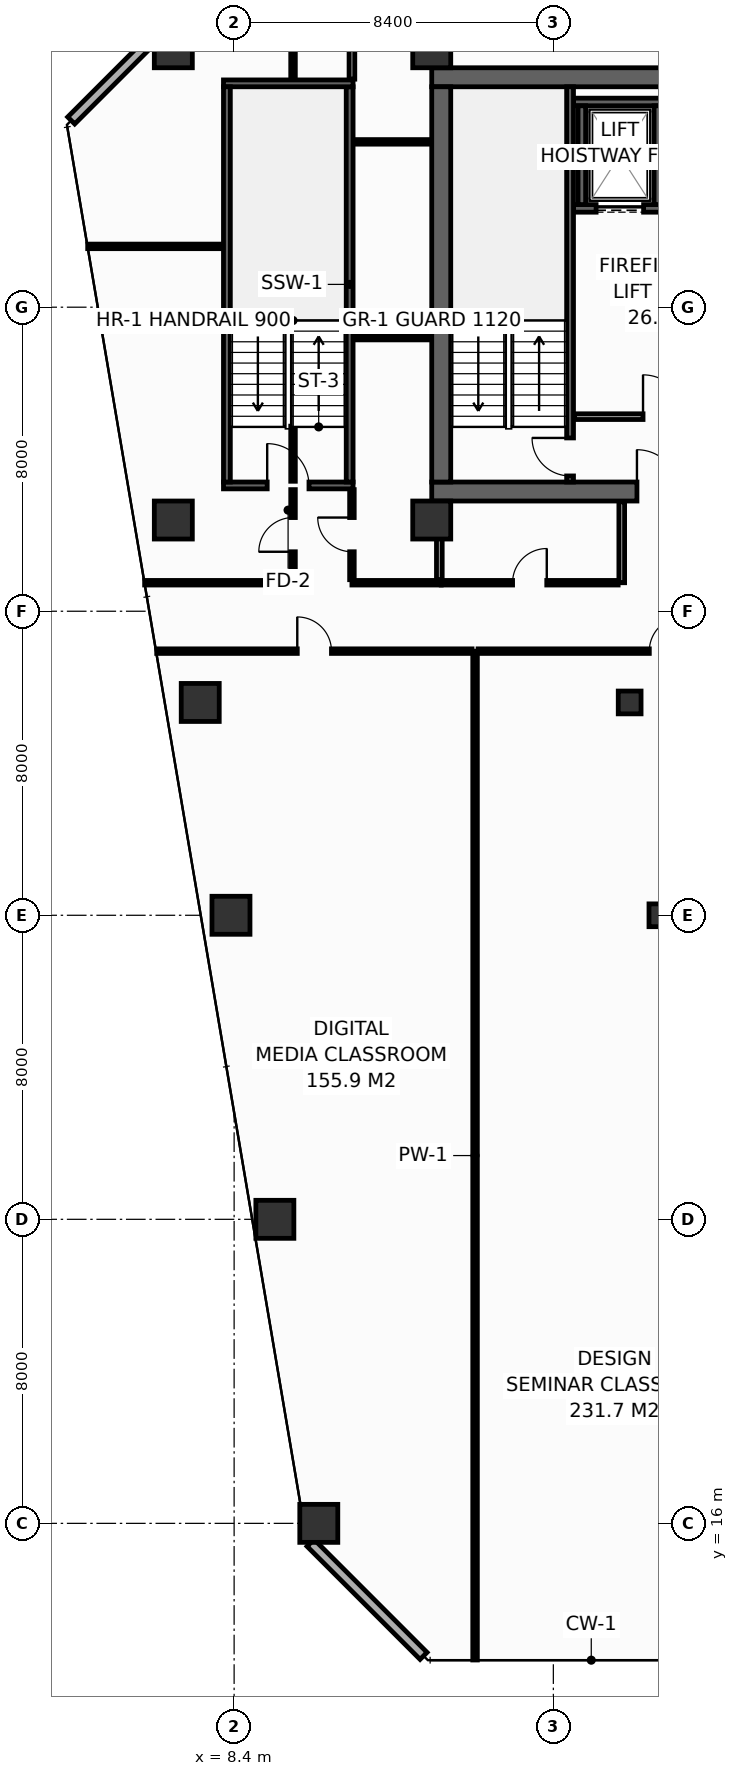
"""IFC4 building model, lengths in metres.
Left out: names, types, materials, properties, quantities, classifications, styles, units other than length and angle.
Written with IfcOpenShell. Run it as: python <this file> out.ifc"""

import sys

from ifc_helpers import new_model, si_unit, direction, frame, frame_2d, origin, origin_2d, place, context, subcontext, project, spatial, rectangle, hollow_rectangle, extrude, element, fill, save


model = new_model("IFC4")
c1 = context("Model", 3, precision=1e-05, world=origin(), true_north=direction((0.0, 1.0)))
c2 = subcontext(c1, "Body", "Model", "MODEL_VIEW")
j1 = project(units=[si_unit("LENGTHUNIT", "METRE"), si_unit("PLANEANGLEUNIT", "RADIAN")], contexts=[c1])
p1 = place(None, origin())
s1 = spatial("IfcSite", under=j1, at=p1, CompositionType="ELEMENT")
p2 = place(p1, origin())
s2 = spatial("IfcBuilding", under=s1, at=p2, CompositionType="ELEMENT")
p3 = place(p2, frame((0.0, 0.0, 171.4)))
s3 = spatial("IfcBuildingStorey", under=s2, at=p3, CompositionType="ELEMENT", Elevation=171.4)
p4 = place(p3, frame((13.6, 43.15, 0.0), z_axis=(0.0, 0.0, 1.0), x_axis=(1.0, 0.0, 0.0)))
e1 = element("IfcWall", 1, at=p4, inside=s3, PredefinedType="SHEAR", context=c2, shape_type="SweptSolid", body=[
    extrude(rectangle(XDim=32.7, YDim=0.5, at=frame_2d((16.35, 0.0))), origin(), (0.0, 0.0, 1.0), 3.55),
])
p5 = place(p4, frame((5.4, 0.0, 0.0)))
e2 = element("IfcOpeningElement", 2, at=p5, cuts=e1, PredefinedType="OPENING", context=c2, shape_type="SweptSolid", body=[
    extrude(rectangle(XDim=1.1, YDim=2.15, at=frame_2d((0.55, 1.075))), frame((0.0, 0.26, 0.0), z_axis=(0.0, -1.0, 0.0), x_axis=(1.0, 0.0, 0.0)), (0.0, 0.0, 1.0), 0.52),
])
p6 = place(p4, frame((25.6, 0.0, 0.0)))
e3 = element("IfcOpeningElement", 3, at=p6, cuts=e1, PredefinedType="OPENING", context=c2, shape_type="SweptSolid", body=[
    extrude(rectangle(XDim=1.1, YDim=2.15, at=frame_2d((0.55, 1.075))), frame((0.0, 0.26, 0.0), z_axis=(0.0, -1.0, 0.0), x_axis=(1.0, 0.0, 0.0)), (0.0, 0.0, 1.0), 0.52),
])
p7 = place(p3, frame((13.6, 54.05, 0.0), z_axis=(0.0, 0.0, 1.0), x_axis=(1.0, 0.0, 0.0)))
e4 = element("IfcWall", 4, at=p7, inside=s3, PredefinedType="SHEAR", context=c2, shape_type="SweptSolid", body=[
    extrude(rectangle(XDim=32.7, YDim=0.5, at=frame_2d((16.35, 0.0))), origin(), (0.0, 0.0, 1.0), 3.55),
])
p8 = place(p3, frame((13.85, 43.4, 0.0), z_axis=(0.0, 0.0, 1.0), x_axis=(0.0, 1.0, 0.0)))
e5 = element("IfcWall", 5, at=p8, inside=s3, PredefinedType="SHEAR", context=c2, shape_type="SweptSolid", body=[
    extrude(rectangle(XDim=10.4, YDim=0.5, at=frame_2d((5.2, 0.0))), origin(), (0.0, 0.0, 1.0), 3.55),
])
for number, where, z_axis, x_axis in (
    (6, (6.8, 54.8, 0.0), (0.0, 0.0, 1.0), (1.0, 0.0, 0.0)),
    (7, (13.6, 54.8, 0.0), (0.0, 0.0, 1.0), (1.0, 0.0, 0.0)),
    (8, (6.8, 42.4, 0.0), (0.0, 0.0, 1.0), (1.0, 0.0, 0.0)),
    (9, (13.6, 42.4, 0.0), (0.0, 0.0, 1.0), (1.0, 0.0, 0.0)),
    (10, (10.628, 16.0, 0.0), (0.0, 0.0, 1.0), (1.0, 0.0, 0.0)),
    (11, (9.472, 24.0, 0.0), (0.0, 0.0, 1.0), (1.0, 0.0, 0.0)),
    (12, (8.317, 32.0, 0.0), (0.0, 0.0, 1.0), (1.0, 0.0, 0.0)),
):
    element("IfcColumn", number, at=place(p3, frame(where, z_axis=z_axis, x_axis=x_axis)), inside=s3, PredefinedType="COLUMN", context=c2, shape_type="SweptSolid", body=[
        extrude(hollow_rectangle(XDim=1.0, YDim=1.0, WallThickness=0.045, at=origin_2d()), origin(), (0.0, 0.0, 1.0), 3.8),
    ])
p9 = place(p3, frame((19.617, 32.0, 0.0), z_axis=(0.0, 0.0, 1.0), x_axis=(1.0, 0.0, 0.0)))
e13 = element("IfcColumn", 13, at=p9, inside=s3, PredefinedType="COLUMN", context=c2, shape_type="SweptSolid", body=[
    extrude(hollow_rectangle(XDim=0.6, YDim=0.6, WallThickness=0.028, at=origin_2d()), origin(), (0.0, 0.0, 1.0), 3.8),
])
p10 = place(p3, frame((7.508, 37.6, 0.0), z_axis=(0.0, 0.0, 1.0), x_axis=(1.0, 0.0, 0.0)))
e14 = element("IfcColumn", 14, at=p10, inside=s3, PredefinedType="COLUMN", context=c2, shape_type="SweptSolid", body=[
    extrude(hollow_rectangle(XDim=1.0, YDim=1.0, WallThickness=0.045, at=origin_2d()), origin(), (0.0, 0.0, 1.0), 3.8),
])
p11 = place(p3, frame((18.808, 37.6, 0.0), z_axis=(0.0, 0.0, 1.0), x_axis=(1.0, 0.0, 0.0)))
e15 = element("IfcColumn", 15, at=p11, inside=s3, PredefinedType="COLUMN", context=c2, shape_type="SweptSolid", body=[
    extrude(hollow_rectangle(XDim=0.6, YDim=0.6, WallThickness=0.028, at=origin_2d()), origin(), (0.0, 0.0, 1.0), 3.8),
])
p12 = place(p3, frame((17.33, 50.6, 0.0), z_axis=(0.0, 0.0, 1.0), x_axis=(1.0, 0.0, 0.0)))
e16 = element("IfcWall", 16, at=p12, inside=s3, PredefinedType="SHEAR", context=c2, shape_type="SweptSolid", body=[
    extrude(rectangle(XDim=2.52, YDim=0.2, at=frame_2d((1.26, 0.0))), origin(), (0.0, 0.0, 1.0), 3.55),
])
p13 = place(p12, frame((0.595, 0.0, 0.0)))
e17 = element("IfcOpeningElement", 17, at=p13, cuts=e16, PredefinedType="OPENING", context=c2, shape_type="SweptSolid", body=[
    extrude(rectangle(XDim=1.25, YDim=2.3, at=frame_2d((0.625, 1.15))), frame((0.0, 0.11, 0.0), z_axis=(0.0, -1.0, 0.0), x_axis=(1.0, 0.0, 0.0)), (0.0, 0.0, 1.0), 0.22),
])
p14 = place(p3, frame((17.33, 53.4, 0.0), z_axis=(0.0, 0.0, 1.0), x_axis=(1.0, 0.0, 0.0)))
e18 = element("IfcWall", 18, at=p14, inside=s3, PredefinedType="SHEAR", context=c2, shape_type="SweptSolid", body=[
    extrude(rectangle(XDim=2.52, YDim=0.2, at=frame_2d((1.26, 0.0))), origin(), (0.0, 0.0, 1.0), 3.55),
])
for number, where, z_axis, x_axis in (
    (19, (17.55, 50.7, 0.0), (0.0, 0.0, 1.0), (0.0, 1.0, 0.0)),
    (20, (19.55, 50.7, 0.0), (0.0, 0.0, 1.0), (0.0, 1.0, 0.0)),
):
    element("IfcWall", number, at=place(p3, frame(where, z_axis=z_axis, x_axis=x_axis)), inside=s3, PredefinedType="SHEAR", context=c2, shape_type="SweptSolid", body=[
        extrude(rectangle(XDim=2.6, YDim=0.2, at=frame_2d((1.3, 0.0))), origin(), (0.0, 0.0, 1.0), 3.55),
    ])
p15 = place(p3, frame((17.24, 43.4, 0.0), z_axis=(0.0, 0.0, 1.0), x_axis=(0.0, 1.0, 0.0)))
e21 = element("IfcWall", 21, at=p15, inside=s3, PredefinedType="SHEAR", context=c2, shape_type="SweptSolid", body=[
    extrude(rectangle(XDim=10.4, YDim=0.18, at=frame_2d((5.2, 0.0))), origin(), (0.0, 0.0, 1.0), 3.55),
])
p16 = place(p15, frame((0.16, 0.0, 0.0)))
e22 = element("IfcOpeningElement", 22, at=p16, cuts=e21, PredefinedType="OPENING", context=c2, shape_type="SweptSolid", body=[
    extrude(rectangle(XDim=1.0, YDim=2.15, at=frame_2d((0.5, 1.075))), frame((0.0, 0.1, 0.0), z_axis=(0.0, -1.0, 0.0), x_axis=(1.0, 0.0, 0.0)), (0.0, 0.0, 1.0), 0.2),
])
p17 = place(p3, frame((8.12, 43.31, 0.0), z_axis=(0.0, 0.0, 1.0), x_axis=(1.0, 0.0, 0.0)))
e23 = element("IfcWall", 23, at=p17, inside=s3, PredefinedType="SHEAR", context=c2, shape_type="SweptSolid", body=[
    extrude(rectangle(XDim=3.41, YDim=0.18, at=frame_2d((1.705, 0.0))), origin(), (0.0, 0.0, 1.0), 3.55),
])
p18 = place(p17, frame((1.15, 0.0, 0.0)))
e24 = element("IfcOpeningElement", 24, at=p18, cuts=e23, PredefinedType="OPENING", context=c2, shape_type="SweptSolid", body=[
    extrude(rectangle(XDim=1.1, YDim=2.15, at=frame_2d((0.55, 1.075))), frame((0.0, 0.1, 0.0), z_axis=(0.0, -1.0, 0.0), x_axis=(1.0, 0.0, 0.0)), (0.0, 0.0, 1.0), 0.2),
])
p19 = place(p3, frame((11.44, 43.4, 0.0), z_axis=(0.0, 0.0, 1.0), x_axis=(0.0, 1.0, 0.0)))
e25 = element("IfcWall", 25, at=p19, inside=s3, PredefinedType="SHEAR", context=c2, shape_type="SweptSolid", body=[
    extrude(rectangle(XDim=10.4, YDim=0.18, at=frame_2d((5.2, 0.0))), origin(), (0.0, 0.0, 1.0), 3.55),
])
p20 = place(p3, frame((11.53, 53.89, 0.0), z_axis=(0.0, 0.0, 1.0), x_axis=(-1.0, 0.0, 0.0)))
e26 = element("IfcWall", 26, at=p20, inside=s3, PredefinedType="SHEAR", context=c2, shape_type="SweptSolid", body=[
    extrude(rectangle(XDim=3.41, YDim=0.18, at=frame_2d((1.705, 0.0))), origin(), (0.0, 0.0, 1.0), 3.55),
])
p21 = place(p3, frame((8.21, 53.8, 0.0), z_axis=(0.0, 0.0, 1.0), x_axis=(0.0, -1.0, 0.0)))
e27 = element("IfcWall", 27, at=p21, inside=s3, PredefinedType="SHEAR", context=c2, shape_type="SweptSolid", body=[
    extrude(rectangle(XDim=10.4, YDim=0.18, at=frame_2d((5.2, 0.0))), origin(), (0.0, 0.0, 1.0), 3.55),
])
p22 = place(p3, frame((17.36, 45.12, 0.0), z_axis=(0.0, 0.0, 1.0), x_axis=(1.0, 0.0, 0.0)))
e28 = element("IfcWall", 28, at=p22, inside=s3, PredefinedType="PARTITIONING", context=c2, shape_type="SweptSolid", body=[
    extrude(rectangle(XDim=5.14, YDim=0.15, at=frame_2d((2.57, 0.0))), origin(), (0.0, 0.0, 1.0), 3.55),
])
p23 = place(p22, frame((1.8, 0.0, 0.0)))
e29 = element("IfcOpeningElement", 29, at=p23, cuts=e28, PredefinedType="OPENING", context=c2, shape_type="SweptSolid", body=[
    extrude(rectangle(XDim=1.1, YDim=2.15, at=frame_2d((0.55, 1.075))), frame((0.0, 0.085, 0.0), z_axis=(0.0, -1.0, 0.0), x_axis=(1.0, 0.0, 0.0)), (0.0, 0.0, 1.0), 0.17),
])
p24 = place(p3, frame((10.411, 15.487, 0.0), z_axis=(0.0, 0.0, 1.0), x_axis=(0.707135806771, -0.70707775441, 0.0)))
e30 = element("IfcWall", 30, at=p24, inside=s3, PredefinedType="STANDARD", context=c2, shape_type="SweptSolid", body=[
    extrude(rectangle(XDim=4.206, YDim=0.26, at=frame_2d((2.103, 0.0))), origin(), (0.0, 0.0, 1.0), 3.55),
])
p25 = place(p3, frame((7.087, 55.887, 0.0), z_axis=(0.0, 0.0, 1.0), x_axis=(-0.707106781187, -0.707106781187, 0.0)))
e31 = element("IfcWall", 31, at=p25, inside=s3, PredefinedType="STANDARD", context=c2, shape_type="SweptSolid", body=[
    extrude(rectangle(XDim=4.206, YDim=0.26, at=frame_2d((2.103, 0.0))), origin(), (0.0, 0.0, 1.0), 3.55),
])
p26 = place(p3, frame((6.045, 40.75, 0.0), z_axis=(0.0, 0.0, 1.0), x_axis=(1.0, 0.0, 0.0)))
e32 = element("IfcWall", 32, at=p26, inside=s3, PredefinedType="PARTITIONING", context=c2, shape_type="SweptSolid", body=[
    extrude(rectangle(XDim=3.905, YDim=0.12, at=frame_2d((1.952, 0.0))), origin(), (0.0, 0.0, 1.0), 3.035),
])
p27 = place(p3, frame((11.5, 40.75, 0.0), z_axis=(0.0, 0.0, 1.0), x_axis=(1.0, 0.0, 0.0)))
e33 = element("IfcWall", 33, at=p27, inside=s3, PredefinedType="PARTITIONING", context=c2, shape_type="SweptSolid", body=[
    extrude(rectangle(XDim=2.35, YDim=0.12, at=frame_2d((1.175, 0.0))), origin(), (0.0, 0.0, 1.0), 3.55),
])
p28 = place(p3, frame((11.55, 52.35, 0.0), z_axis=(0.0, 0.0, 1.0), x_axis=(1.0, 0.0, 0.0)))
e34 = element("IfcWall", 34, at=p28, inside=s3, PredefinedType="PARTITIONING", context=c2, shape_type="SweptSolid", body=[
    extrude(rectangle(XDim=2.03, YDim=0.12, at=frame_2d((1.015, 0.0))), origin(), (0.0, 0.0, 1.0), 3.55),
])
p29 = place(p3, frame((11.5, 54.0, 0.0), z_axis=(0.0, 0.0, 1.0), x_axis=(0.0, 1.0, 0.0)))
e35 = element("IfcWall", 35, at=p29, inside=s3, PredefinedType="PARTITIONING", context=c2, shape_type="SweptSolid", body=[
    extrude(rectangle(XDim=1.995, YDim=0.15, at=frame_2d((0.998, 0.0))), origin(), (0.0, 0.0, 1.0), 2.935),
])
p30 = place(p3, frame((4.547, 49.6, 0.0), z_axis=(0.0, 0.0, 1.0), x_axis=(1.0, 0.0, 0.0)))
e36 = element("IfcWall", 36, at=p30, inside=s3, PredefinedType="PARTITIONING", context=c2, shape_type="SweptSolid", body=[
    extrude(rectangle(XDim=3.553, YDim=0.12, at=frame_2d((1.777, 0.0))), origin(), (0.0, 0.0, 1.0), 2.835),
])
p31 = place(p3, frame((9.95, 40.83, 0.0), z_axis=(0.0, 0.0, 1.0), x_axis=(0.0, 1.0, 0.0)))
e37 = element("IfcWall", 37, at=p31, inside=s3, PredefinedType="PARTITIONING", context=c2, shape_type="SweptSolid", body=[
    extrude(rectangle(XDim=2.37, YDim=0.12, at=frame_2d((1.185, 0.0))), origin(), (0.0, 0.0, 1.0), 2.835),
])
p32 = place(p31, frame((0.735, 0.0, 0.0)))
e38 = element("IfcOpeningElement", 38, at=p32, cuts=e37, PredefinedType="OPENING", context=c2, shape_type="SweptSolid", body=[
    extrude(rectangle(XDim=0.9, YDim=2.1, at=frame_2d((0.45, 1.05))), frame((0.0, 0.07, 0.0), z_axis=(0.0, -1.0, 0.0), x_axis=(1.0, 0.0, 0.0)), (0.0, 0.0, 1.0), 0.14),
])
p33 = place(p3, frame((9.95, 43.42, 0.0), z_axis=(0.0, 0.0, 1.0), x_axis=(0.0, 1.0, 0.0)))
e39 = element("IfcWall", 39, at=p33, inside=s3, PredefinedType="PARTITIONING", context=c2, shape_type="SweptSolid", body=[
    extrude(rectangle(XDim=1.45, YDim=0.12, at=frame_2d((0.725, 0.0))), origin(), (0.0, 0.0, 1.0), 3.55),
])
p34 = place(p3, frame((9.95, 54.0, 0.0), z_axis=(0.0, 0.0, 1.0), x_axis=(0.0, 1.0, 0.0)))
e40 = element("IfcWall", 40, at=p34, inside=s3, PredefinedType="PARTITIONING", context=c2, shape_type="SweptSolid", body=[
    extrude(rectangle(XDim=1.995, YDim=0.12, at=frame_2d((0.998, 0.0))), origin(), (0.0, 0.0, 1.0), 2.935),
])
p35 = place(p3, frame((11.55, 47.2, 0.0), z_axis=(0.0, 0.0, 1.0), x_axis=(1.0, 0.0, 0.0)))
e41 = element("IfcWall", 41, at=p35, inside=s3, PredefinedType="PARTITIONING", context=c2, shape_type="SweptSolid", body=[
    extrude(rectangle(XDim=2.03, YDim=0.12, at=frame_2d((1.015, 0.0))), origin(), (0.0, 0.0, 1.0), 3.55),
])
p36 = place(p3, frame((11.5, 40.83, 0.0), z_axis=(0.0, 0.0, 1.0), x_axis=(0.0, 1.0, 0.0)))
e42 = element("IfcWall", 42, at=p36, inside=s3, PredefinedType="PARTITIONING", context=c2, shape_type="SweptSolid", body=[
    extrude(rectangle(XDim=2.37, YDim=0.12, at=frame_2d((1.185, 0.0))), origin(), (0.0, 0.0, 1.0), 2.835),
])
p37 = place(p36, frame((0.735, 0.0, 0.0)))
e43 = element("IfcOpeningElement", 43, at=p37, cuts=e42, PredefinedType="OPENING", context=c2, shape_type="SweptSolid", body=[
    extrude(rectangle(XDim=0.9, YDim=2.1, at=frame_2d((0.45, 1.05))), frame((0.0, 0.07, 0.0), z_axis=(0.0, -1.0, 0.0), x_axis=(1.0, 0.0, 0.0)), (0.0, 0.0, 1.0), 0.14),
])
p38 = place(p3, frame((13.8, 40.83, 0.0), z_axis=(0.0, 0.0, 1.0), x_axis=(0.0, 1.0, 0.0)))
e44 = element("IfcWall", 44, at=p38, inside=s3, PredefinedType="PARTITIONING", context=c2, shape_type="SweptSolid", body=[
    extrude(rectangle(XDim=2.05, YDim=0.15, at=frame_2d((1.025, 0.0))), origin(), (0.0, 0.0, 1.0), 3.55),
])
p39 = place(p3, frame((18.6, 40.75, 0.0), z_axis=(0.0, 0.0, 1.0), x_axis=(0.0, 1.0, 0.0)))
e45 = element("IfcWall", 45, at=p39, inside=s3, PredefinedType="PARTITIONING", context=c2, shape_type="SweptSolid", body=[
    extrude(rectangle(XDim=2.13, YDim=0.15, at=frame_2d((1.065, 0.0))), origin(), (0.0, 0.0, 1.0), 3.55),
])
p40 = place(p3, frame((13.85, 40.75, 0.0), z_axis=(0.0, 0.0, 1.0), x_axis=(1.0, 0.0, 0.0)))
e46 = element("IfcWall", 46, at=p40, inside=s3, PredefinedType="PARTITIONING", context=c2, shape_type="SweptSolid", body=[
    extrude(rectangle(XDim=4.655, YDim=0.12, at=frame_2d((2.327, 0.0))), origin(), (0.0, 0.0, 1.0), 3.55),
])
p41 = place(p40, frame((1.877, 0.0, 0.0)))
e47 = element("IfcOpeningElement", 47, at=p41, cuts=e46, PredefinedType="OPENING", context=c2, shape_type="SweptSolid", body=[
    extrude(rectangle(XDim=0.9, YDim=2.1, at=frame_2d((0.45, 1.05))), frame((0.0, 0.07, 0.0), z_axis=(0.0, -1.0, 0.0), x_axis=(1.0, 0.0, 0.0)), (0.0, 0.0, 1.0), 0.14),
])
p42 = place(p3, frame((14.74, 12.405, 0.0), z_axis=(0.0, 0.0, 1.0), x_axis=(0.0, 1.0, 0.0)))
e48 = element("IfcWall", 48, at=p42, inside=s3, PredefinedType="PARTITIONING", context=c2, shape_type="SweptSolid", body=[
    extrude(rectangle(XDim=26.545, YDim=0.12, at=frame_2d((13.272, 0.0))), origin(), (0.0, 0.0, 1.0), 2.835),
])
p43 = place(p3, frame((6.363, 38.95, 0.0), z_axis=(0.0, 0.0, 1.0), x_axis=(1.0, 0.0, 0.0)))
e49 = element("IfcWall", 49, at=p43, inside=s3, PredefinedType="PARTITIONING", context=c2, shape_type="SweptSolid", body=[
    extrude(rectangle(XDim=8.297, YDim=0.12, at=frame_2d((4.148, 0.0))), origin(), (0.0, 0.0, 1.0), 3.035),
])
p44 = place(p43, frame((3.699, 0.0, 0.0)))
e50 = element("IfcOpeningElement", 50, at=p44, cuts=e49, PredefinedType="OPENING", context=c2, shape_type="SweptSolid", body=[
    extrude(rectangle(XDim=0.9, YDim=2.1, at=frame_2d((0.45, 1.05))), frame((0.0, 0.07, 0.0), z_axis=(0.0, -1.0, 0.0), x_axis=(1.0, 0.0, 0.0)), (0.0, 0.0, 1.0), 0.14),
])
p45 = place(p3, frame((14.82, 38.95, 0.0), z_axis=(0.0, 0.0, 1.0), x_axis=(1.0, 0.0, 0.0)))
e51 = element("IfcWall", 51, at=p45, inside=s3, PredefinedType="PARTITIONING", context=c2, shape_type="SweptSolid", body=[
    extrude(rectangle(XDim=9.03, YDim=0.12, at=frame_2d((4.515, 0.0))), origin(), (0.0, 0.0, 1.0), 2.835),
])
p46 = place(p45, frame((4.505, 0.0, 0.0)))
e52 = element("IfcOpeningElement", 52, at=p46, cuts=e51, PredefinedType="OPENING", context=c2, shape_type="SweptSolid", body=[
    extrude(rectangle(XDim=0.9, YDim=2.1, at=frame_2d((0.45, 1.05))), frame((0.0, 0.07, 0.0), z_axis=(0.0, -1.0, 0.0), x_axis=(1.0, 0.0, 0.0)), (0.0, 0.0, 1.0), 0.14),
])
p47 = place(p13, origin())
e53 = element("IfcDoor", 53, at=p47, inside=s3, OperationType="SLIDING_TO_LEFT", PredefinedType="DOOR", context=c2, shape_type="SweptSolid", body=[
    extrude(rectangle(XDim=1.25, YDim=2.3, at=frame_2d((0.625, 1.15))), frame((0.0, 0.025, 0.0), z_axis=(0.0, -1.0, 0.0), x_axis=(1.0, 0.0, 0.0)), (0.0, 0.0, 1.0), 0.05),
])
fill(e17, e53)
p48 = place(p16, origin())
e54 = element("IfcDoor", 54, at=p48, inside=s3, OperationType="SINGLE_SWING_RIGHT", PredefinedType="DOOR", context=c2, shape_type="SweptSolid", body=[
    extrude(rectangle(XDim=1.0, YDim=2.15, at=frame_2d((0.5, 1.075))), frame((0.0, 0.025, 0.0), z_axis=(0.0, -1.0, 0.0), x_axis=(1.0, 0.0, 0.0)), (0.0, 0.0, 1.0), 0.05),
])
fill(e22, e54)
p49 = place(p18, origin())
e55 = element("IfcDoor", 55, at=p49, inside=s3, OperationType="SINGLE_SWING_LEFT", PredefinedType="DOOR", context=c2, shape_type="SweptSolid", body=[
    extrude(rectangle(XDim=1.1, YDim=2.15, at=frame_2d((0.55, 1.075))), frame((0.0, 0.025, 0.0), z_axis=(0.0, -1.0, 0.0), x_axis=(1.0, 0.0, 0.0)), (0.0, 0.0, 1.0), 0.05),
])
fill(e24, e55)
p50 = place(p23, origin())
e56 = element("IfcDoor", 56, at=p50, inside=s3, OperationType="SINGLE_SWING_LEFT", PredefinedType="DOOR", context=c2, shape_type="SweptSolid", body=[
    extrude(rectangle(XDim=1.1, YDim=2.15, at=frame_2d((0.55, 1.075))), frame((0.0, 0.025, 0.0), z_axis=(0.0, -1.0, 0.0), x_axis=(1.0, 0.0, 0.0)), (0.0, 0.0, 1.0), 0.05),
])
fill(e29, e56)
p51 = place(p5, origin())
e57 = element("IfcDoor", 57, at=p51, inside=s3, OperationType="SINGLE_SWING_LEFT", PredefinedType="DOOR", context=c2, shape_type="SweptSolid", body=[
    extrude(rectangle(XDim=1.1, YDim=2.15, at=frame_2d((0.55, 1.075))), frame((0.0, 0.025, 0.0), z_axis=(0.0, -1.0, 0.0), x_axis=(1.0, 0.0, 0.0)), (0.0, 0.0, 1.0), 0.05),
])
fill(e2, e57)
p52 = place(p32, origin())
e58 = element("IfcDoor", 58, at=p52, inside=s3, OperationType="SINGLE_SWING_LEFT", PredefinedType="DOOR", context=c2, shape_type="SweptSolid", body=[
    extrude(rectangle(XDim=0.9, YDim=2.1, at=frame_2d((0.45, 1.05))), frame((0.0, 0.025, 0.0), z_axis=(0.0, -1.0, 0.0), x_axis=(1.0, 0.0, 0.0)), (0.0, 0.0, 1.0), 0.05),
])
fill(e38, e58)
p53 = place(p37, origin())
e59 = element("IfcDoor", 59, at=p53, inside=s3, OperationType="SINGLE_SWING_RIGHT", PredefinedType="DOOR", context=c2, shape_type="SweptSolid", body=[
    extrude(rectangle(XDim=0.9, YDim=2.1, at=frame_2d((0.45, 1.05))), frame((0.0, 0.025, 0.0), z_axis=(0.0, -1.0, 0.0), x_axis=(1.0, 0.0, 0.0)), (0.0, 0.0, 1.0), 0.05),
])
fill(e43, e59)
p54 = place(p41, origin())
e60 = element("IfcDoor", 60, at=p54, inside=s3, OperationType="SINGLE_SWING_RIGHT", PredefinedType="DOOR", context=c2, shape_type="SweptSolid", body=[
    extrude(rectangle(XDim=0.9, YDim=2.1, at=frame_2d((0.45, 1.05))), frame((0.0, 0.025, 0.0), z_axis=(0.0, -1.0, 0.0), x_axis=(1.0, 0.0, 0.0)), (0.0, 0.0, 1.0), 0.05),
])
fill(e47, e60)
p55 = place(p44, origin())
e61 = element("IfcDoor", 61, at=p55, inside=s3, OperationType="SINGLE_SWING_LEFT", PredefinedType="DOOR", context=c2, shape_type="SweptSolid", body=[
    extrude(rectangle(XDim=0.9, YDim=2.1, at=frame_2d((0.45, 1.05))), frame((0.0, 0.025, 0.0), z_axis=(0.0, -1.0, 0.0), x_axis=(1.0, 0.0, 0.0)), (0.0, 0.0, 1.0), 0.05),
])
fill(e50, e61)
p56 = place(p46, origin())
e62 = element("IfcDoor", 62, at=p56, inside=s3, OperationType="SINGLE_SWING_RIGHT", PredefinedType="DOOR", context=c2, shape_type="SweptSolid", body=[
    extrude(rectangle(XDim=0.9, YDim=2.1, at=frame_2d((0.45, 1.05))), frame((0.0, 0.025, 0.0), z_axis=(0.0, -1.0, 0.0), x_axis=(1.0, 0.0, 0.0)), (0.0, 0.0, 1.0), 0.05),
])
fill(e52, e62)
save(model, sys.argv[1])
